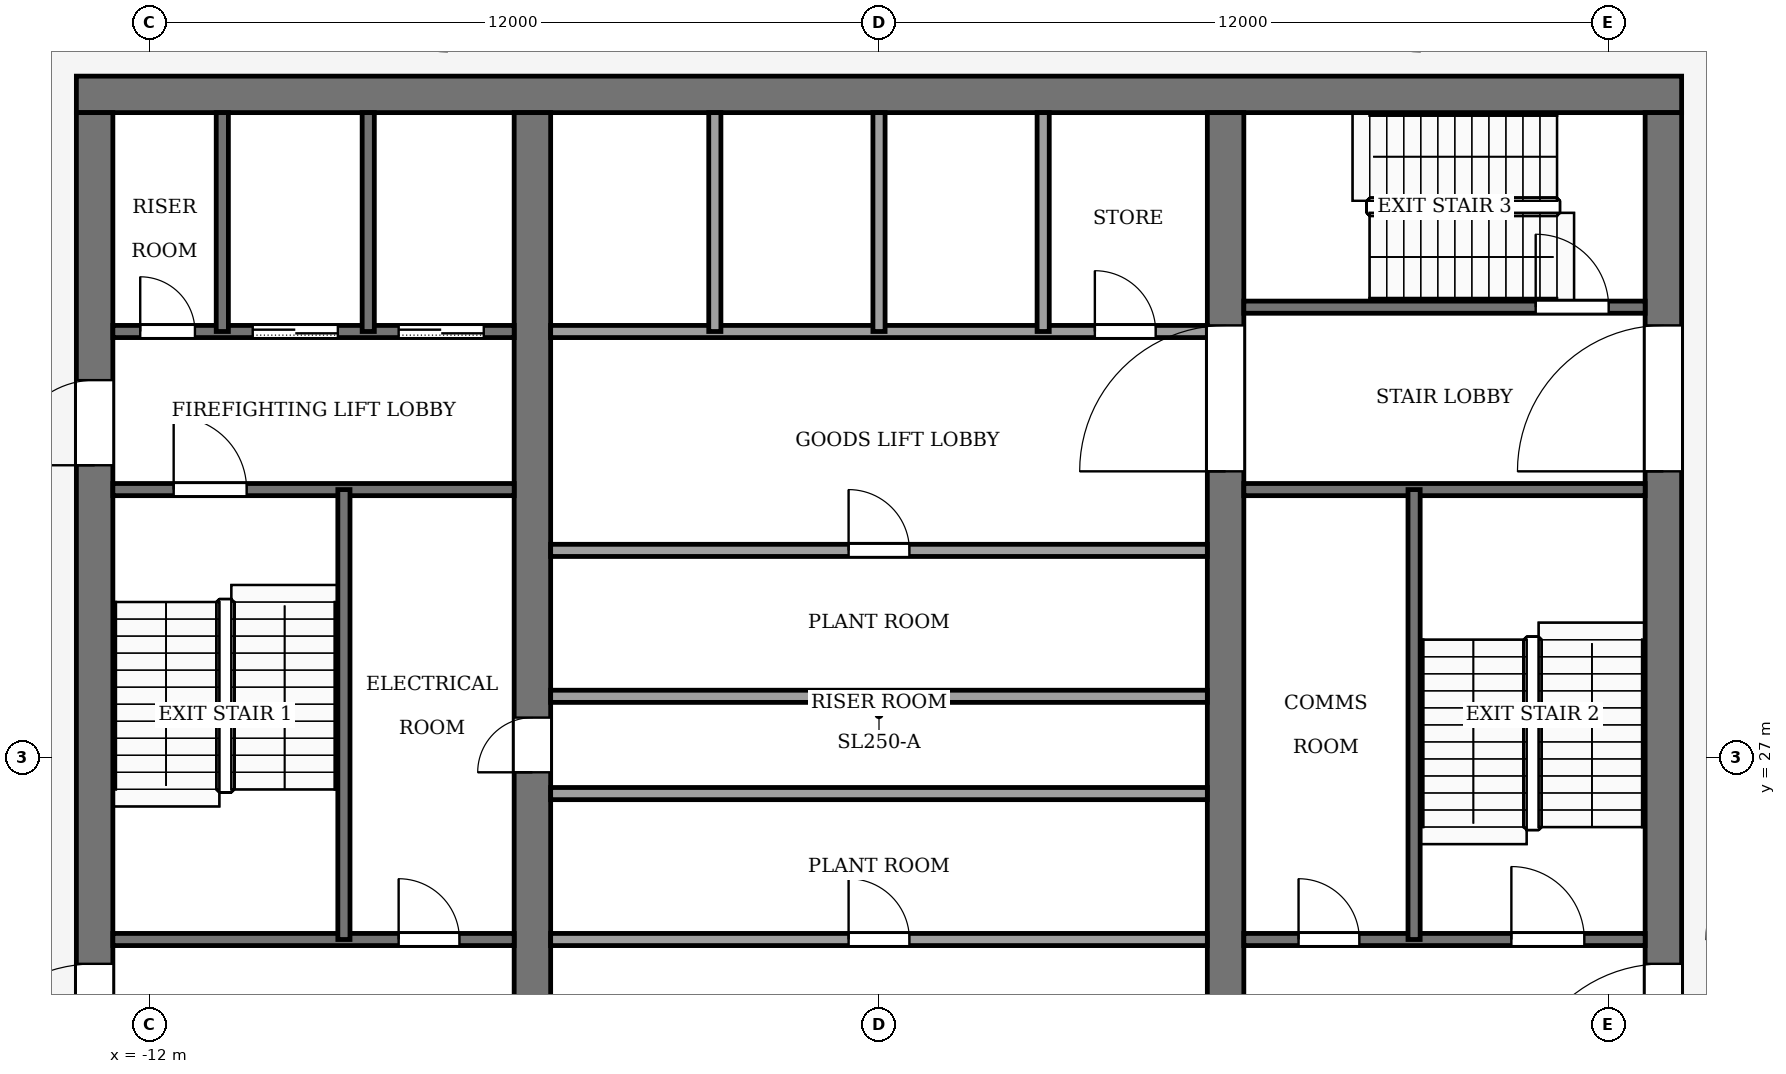
"""IFC4 building model, lengths in metres.
Left out: names, types, materials, properties, quantities, classifications, styles, units other than length and angle.
Written with IfcOpenShell. Run it as: python <this file> out.ifc"""

import sys

from ifc_helpers import new_model, si_unit, direction, frame, frame_2d, origin, place, context, subcontext, project, spatial, rectangle, extrude, element, fill, save


model = new_model("IFC4")
c1 = context("Model", 3, precision=1e-05, world=origin(), true_north=direction((0.0, 1.0)))
c2 = subcontext(c1, "Body", "Model", "MODEL_VIEW")
j1 = project(units=[si_unit("LENGTHUNIT", "METRE"), si_unit("PLANEANGLEUNIT", "RADIAN")], contexts=[c1])
p1 = place(None, origin())
s1 = spatial("IfcSite", under=j1, at=p1, CompositionType="ELEMENT")
p2 = place(p1, origin())
s2 = spatial("IfcBuilding", under=s1, at=p2, CompositionType="ELEMENT")
p3 = place(p2, frame((0.0, 0.0, 340.5)))
s3 = spatial("IfcBuildingStorey", under=s2, at=p3, CompositionType="ELEMENT", Elevation=340.5)
p4 = place(p3, frame((-13.2, 37.9, -0.15), z_axis=(0.0, 0.0, 1.0), x_axis=(1.0, 0.0, 0.0)))
e1 = element("IfcWall", 1, at=p4, inside=s3, PredefinedType="SHEAR", context=c2, shape_type="SweptSolid", body=[
    extrude(rectangle(XDim=26.4, YDim=0.6, at=frame_2d((13.2, 0.0))), origin(), (0.0, 0.0, 1.0), 9.0),
])
p5 = place(p3, frame((-12.9, 18.4, -0.15), z_axis=(0.0, 0.0, 1.0), x_axis=(0.0, 1.0, 0.0)))
e2 = element("IfcWall", 2, at=p5, inside=s3, PredefinedType="SHEAR", context=c2, shape_type="SweptSolid", body=[
    extrude(rectangle(XDim=19.2, YDim=0.6, at=frame_2d((9.6, 0.0))), origin(), (0.0, 0.0, 1.0), 9.0),
])
p6 = place(p5, frame((2.8, 0.0, 0.15)))
e3 = element("IfcOpeningElement", 3, at=p6, cuts=e2, PredefinedType="OPENING", context=c2, shape_type="SweptSolid", body=[
    extrude(rectangle(XDim=2.4, YDim=2.4, at=frame_2d((1.2, 1.2))), frame((0.0, 0.31, 0.0), z_axis=(0.0, -1.0, 0.0), x_axis=(1.0, 0.0, 0.0)), (0.0, 0.0, 1.0), 0.62),
])
p7 = place(p5, frame((13.4, 0.0, 0.15)))
e4 = element("IfcOpeningElement", 4, at=p7, cuts=e2, PredefinedType="OPENING", context=c2, shape_type="SweptSolid", body=[
    extrude(rectangle(XDim=1.4, YDim=2.2, at=frame_2d((0.7, 1.1))), frame((0.0, 0.31, 0.0), z_axis=(0.0, -1.0, 0.0), x_axis=(1.0, 0.0, 0.0)), (0.0, 0.0, 1.0), 0.62),
])
p8 = place(p3, frame((12.9, 18.4, -0.15), z_axis=(0.0, 0.0, 1.0), x_axis=(0.0, 1.0, 0.0)))
e5 = element("IfcWall", 5, at=p8, inside=s3, PredefinedType="SHEAR", context=c2, shape_type="SweptSolid", body=[
    extrude(rectangle(XDim=19.2, YDim=0.6, at=frame_2d((9.6, 0.0))), origin(), (0.0, 0.0, 1.0), 9.0),
])
p9 = place(p8, frame((2.8, 0.0, 0.15)))
e6 = element("IfcOpeningElement", 6, at=p9, cuts=e5, PredefinedType="OPENING", context=c2, shape_type="SweptSolid", body=[
    extrude(rectangle(XDim=2.4, YDim=2.4, at=frame_2d((1.2, 1.2))), frame((0.0, 0.31, 0.0), z_axis=(0.0, -1.0, 0.0), x_axis=(1.0, 0.0, 0.0)), (0.0, 0.0, 1.0), 0.62),
])
p10 = place(p8, frame((13.3, 0.0, 0.15)))
e7 = element("IfcOpeningElement", 7, at=p10, cuts=e5, PredefinedType="OPENING", context=c2, shape_type="SweptSolid", body=[
    extrude(rectangle(XDim=2.4, YDim=2.4, at=frame_2d((1.2, 1.2))), frame((0.0, 0.31, 0.0), z_axis=(0.0, -1.0, 0.0), x_axis=(1.0, 0.0, 0.0)), (0.0, 0.0, 1.0), 0.62),
])
p11 = place(p3, frame((-5.7, 18.4, -0.15), z_axis=(0.0, 0.0, 1.0), x_axis=(0.0, 1.0, 0.0)))
e8 = element("IfcWall", 8, at=p11, inside=s3, PredefinedType="SHEAR", context=c2, shape_type="SweptSolid", body=[
    extrude(rectangle(XDim=19.2, YDim=0.6, at=frame_2d((9.6, 0.0))), origin(), (0.0, 0.0, 1.0), 9.0),
])
p12 = place(p11, frame((8.35, 0.0, 0.15)))
e9 = element("IfcOpeningElement", 9, at=p12, cuts=e8, PredefinedType="OPENING", context=c2, shape_type="SweptSolid", body=[
    extrude(rectangle(XDim=0.9, YDim=2.1, at=frame_2d((0.45, 1.05))), frame((0.0, 0.31, 0.0), z_axis=(0.0, -1.0, 0.0), x_axis=(1.0, 0.0, 0.0)), (0.0, 0.0, 1.0), 0.62),
])
p13 = place(p3, frame((5.7, 18.4, -0.15), z_axis=(0.0, 0.0, 1.0), x_axis=(0.0, 1.0, 0.0)))
e10 = element("IfcWall", 10, at=p13, inside=s3, PredefinedType="SHEAR", context=c2, shape_type="SweptSolid", body=[
    extrude(rectangle(XDim=19.2, YDim=0.6, at=frame_2d((9.6, 0.0))), origin(), (0.0, 0.0, 1.0), 9.0),
])
p14 = place(p13, frame((13.3, 0.0, 0.15)))
e11 = element("IfcOpeningElement", 11, at=p14, cuts=e10, PredefinedType="OPENING", context=c2, shape_type="SweptSolid", body=[
    extrude(rectangle(XDim=2.4, YDim=2.4, at=frame_2d((1.2, 1.2))), frame((0.0, 0.31, 0.0), z_axis=(0.0, -1.0, 0.0), x_axis=(1.0, 0.0, 0.0)), (0.0, 0.0, 1.0), 0.62),
])
p15 = place(p3, frame((-12.6, 24.0, 0.0), z_axis=(0.0, 0.0, 1.0), x_axis=(1.0, 0.0, 0.0)))
e12 = element("IfcWall", 12, at=p15, inside=s3, PredefinedType="PARTITIONING", context=c2, shape_type="SweptSolid", body=[
    extrude(rectangle(XDim=6.6, YDim=0.2, at=frame_2d((3.3, 0.0))), origin(), (0.0, 0.0, 1.0), 8.85),
])
p16 = place(p15, frame((4.7, 0.0, 0.0)))
e13 = element("IfcOpeningElement", 13, at=p16, cuts=e12, PredefinedType="OPENING", context=c2, shape_type="SweptSolid", body=[
    extrude(rectangle(XDim=1.0, YDim=2.1, at=frame_2d((0.5, 1.05))), frame((0.0, 0.11, 0.0), z_axis=(0.0, -1.0, 0.0), x_axis=(1.0, 0.0, 0.0)), (0.0, 0.0, 1.0), 0.22),
])
p17 = place(p3, frame((-5.4, 24.0, 0.0), z_axis=(0.0, 0.0, 1.0), x_axis=(1.0, 0.0, 0.0)))
e14 = element("IfcWall", 14, at=p17, inside=s3, PredefinedType="PARTITIONING", context=c2, shape_type="SweptSolid", body=[
    extrude(rectangle(XDim=10.8, YDim=0.2, at=frame_2d((5.4, 0.0))), origin(), (0.0, 0.0, 1.0), 8.85),
])
p18 = place(p17, frame((4.9, 0.0, 0.0)))
e15 = element("IfcOpeningElement", 15, at=p18, cuts=e14, PredefinedType="OPENING", context=c2, shape_type="SweptSolid", body=[
    extrude(rectangle(XDim=1.0, YDim=2.1, at=frame_2d((0.5, 1.05))), frame((0.0, 0.11, 0.0), z_axis=(0.0, -1.0, 0.0), x_axis=(1.0, 0.0, 0.0)), (0.0, 0.0, 1.0), 0.22),
])
p19 = place(p3, frame((6.0, 24.0, 0.0), z_axis=(0.0, 0.0, 1.0), x_axis=(1.0, 0.0, 0.0)))
e16 = element("IfcWall", 16, at=p19, inside=s3, PredefinedType="PARTITIONING", context=c2, shape_type="SweptSolid", body=[
    extrude(rectangle(XDim=6.6, YDim=0.2, at=frame_2d((3.3, 0.0))), origin(), (0.0, 0.0, 1.0), 8.85),
])
p20 = place(p19, frame((0.9, 0.0, 0.0)))
e17 = element("IfcOpeningElement", 17, at=p20, cuts=e16, PredefinedType="OPENING", context=c2, shape_type="SweptSolid", body=[
    extrude(rectangle(XDim=1.0, YDim=2.1, at=frame_2d((0.5, 1.05))), frame((0.0, 0.11, 0.0), z_axis=(0.0, -1.0, 0.0), x_axis=(1.0, 0.0, 0.0)), (0.0, 0.0, 1.0), 0.22),
])
p21 = place(p19, frame((4.4, 0.0, 0.0)))
e18 = element("IfcOpeningElement", 18, at=p21, cuts=e16, PredefinedType="OPENING", context=c2, shape_type="SweptSolid", body=[
    extrude(rectangle(XDim=1.2, YDim=2.2, at=frame_2d((0.6, 1.1))), frame((0.0, 0.11, 0.0), z_axis=(0.0, -1.0, 0.0), x_axis=(1.0, 0.0, 0.0)), (0.0, 0.0, 1.0), 0.22),
])
for number, where, z_axis, x_axis in (
    (19, (-5.4, 26.4, 0.0), (0.0, 0.0, 1.0), (1.0, 0.0, 0.0)),
    (20, (-5.4, 28.0, 0.0), (0.0, 0.0, 1.0), (1.0, 0.0, 0.0)),
):
    element("IfcWall", number, at=place(p3, frame(where, z_axis=z_axis, x_axis=x_axis)), inside=s3, PredefinedType="PARTITIONING", context=c2, shape_type="SweptSolid", body=[
        extrude(rectangle(XDim=10.8, YDim=0.2, at=frame_2d((5.4, 0.0))), origin(), (0.0, 0.0, 1.0), 8.85),
    ])
p22 = place(p3, frame((-5.4, 30.4, 0.0), z_axis=(0.0, 0.0, 1.0), x_axis=(1.0, 0.0, 0.0)))
e21 = element("IfcWall", 21, at=p22, inside=s3, PredefinedType="PARTITIONING", context=c2, shape_type="SweptSolid", body=[
    extrude(rectangle(XDim=10.8, YDim=0.2, at=frame_2d((5.4, 0.0))), origin(), (0.0, 0.0, 1.0), 8.85),
])
p23 = place(p22, frame((4.9, 0.0, 0.0)))
e22 = element("IfcOpeningElement", 22, at=p23, cuts=e21, PredefinedType="OPENING", context=c2, shape_type="SweptSolid", body=[
    extrude(rectangle(XDim=1.0, YDim=2.1, at=frame_2d((0.5, 1.05))), frame((0.0, 0.11, 0.0), z_axis=(0.0, -1.0, 0.0), x_axis=(1.0, 0.0, 0.0)), (0.0, 0.0, 1.0), 0.22),
])
p24 = place(p3, frame((-12.6, 31.4, 0.0), z_axis=(0.0, 0.0, 1.0), x_axis=(1.0, 0.0, 0.0)))
e23 = element("IfcWall", 23, at=p24, inside=s3, PredefinedType="PARTITIONING", context=c2, shape_type="SweptSolid", body=[
    extrude(rectangle(XDim=6.6, YDim=0.2, at=frame_2d((3.3, 0.0))), origin(), (0.0, 0.0, 1.0), 8.85),
])
p25 = place(p24, frame((1.0, 0.0, 0.0)))
e24 = element("IfcOpeningElement", 24, at=p25, cuts=e23, PredefinedType="OPENING", context=c2, shape_type="SweptSolid", body=[
    extrude(rectangle(XDim=1.2, YDim=2.2, at=frame_2d((0.6, 1.1))), frame((0.0, 0.11, 0.0), z_axis=(0.0, -1.0, 0.0), x_axis=(1.0, 0.0, 0.0)), (0.0, 0.0, 1.0), 0.22),
])
p26 = place(p3, frame((6.0, 31.4, 0.0), z_axis=(0.0, 0.0, 1.0), x_axis=(1.0, 0.0, 0.0)))
e25 = element("IfcWall", 25, at=p26, inside=s3, PredefinedType="PARTITIONING", context=c2, shape_type="SweptSolid", body=[
    extrude(rectangle(XDim=6.6, YDim=0.2, at=frame_2d((3.3, 0.0))), origin(), (0.0, 0.0, 1.0), 8.85),
])
p27 = place(p3, frame((-12.6, 34.0, 0.0), z_axis=(0.0, 0.0, 1.0), x_axis=(1.0, 0.0, 0.0)))
e26 = element("IfcWall", 26, at=p27, inside=s3, PredefinedType="PARTITIONING", context=c2, shape_type="SweptSolid", body=[
    extrude(rectangle(XDim=6.6, YDim=0.2, at=frame_2d((3.3, 0.0))), origin(), (0.0, 0.0, 1.0), 8.85),
])
p28 = place(p27, frame((4.7, 0.0, 0.0)))
e27 = element("IfcOpeningElement", 27, at=p28, cuts=e26, PredefinedType="OPENING", context=c2, shape_type="SweptSolid", body=[
    extrude(rectangle(XDim=1.4, YDim=2.2, at=frame_2d((0.7, 1.1))), frame((0.0, 0.11, 0.0), z_axis=(0.0, -1.0, 0.0), x_axis=(1.0, 0.0, 0.0)), (0.0, 0.0, 1.0), 0.22),
])
p29 = place(p27, frame((2.3, 0.0, 0.0)))
e28 = element("IfcOpeningElement", 28, at=p29, cuts=e26, PredefinedType="OPENING", context=c2, shape_type="SweptSolid", body=[
    extrude(rectangle(XDim=1.4, YDim=2.2, at=frame_2d((0.7, 1.1))), frame((0.0, 0.11, 0.0), z_axis=(0.0, -1.0, 0.0), x_axis=(1.0, 0.0, 0.0)), (0.0, 0.0, 1.0), 0.22),
])
p30 = place(p27, frame((0.45, 0.0, 0.0)))
e29 = element("IfcOpeningElement", 29, at=p30, cuts=e26, PredefinedType="OPENING", context=c2, shape_type="SweptSolid", body=[
    extrude(rectangle(XDim=0.9, YDim=2.1, at=frame_2d((0.45, 1.05))), frame((0.0, 0.11, 0.0), z_axis=(0.0, -1.0, 0.0), x_axis=(1.0, 0.0, 0.0)), (0.0, 0.0, 1.0), 0.22),
])
p31 = place(p3, frame((-5.4, 34.0, 0.0), z_axis=(0.0, 0.0, 1.0), x_axis=(1.0, 0.0, 0.0)))
e30 = element("IfcWall", 30, at=p31, inside=s3, PredefinedType="PARTITIONING", context=c2, shape_type="SweptSolid", body=[
    extrude(rectangle(XDim=10.8, YDim=0.2, at=frame_2d((5.4, 0.0))), origin(), (0.0, 0.0, 1.0), 8.85),
])
p32 = place(p31, frame((8.95, 0.0, 0.0)))
e31 = element("IfcOpeningElement", 31, at=p32, cuts=e30, PredefinedType="OPENING", context=c2, shape_type="SweptSolid", body=[
    extrude(rectangle(XDim=1.0, YDim=2.1, at=frame_2d((0.5, 1.05))), frame((0.0, 0.11, 0.0), z_axis=(0.0, -1.0, 0.0), x_axis=(1.0, 0.0, 0.0)), (0.0, 0.0, 1.0), 0.22),
])
p33 = place(p3, frame((6.0, 34.4, 0.0), z_axis=(0.0, 0.0, 1.0), x_axis=(1.0, 0.0, 0.0)))
e32 = element("IfcWall", 32, at=p33, inside=s3, PredefinedType="PARTITIONING", context=c2, shape_type="SweptSolid", body=[
    extrude(rectangle(XDim=6.6, YDim=0.2, at=frame_2d((3.3, 0.0))), origin(), (0.0, 0.0, 1.0), 8.85),
])
p34 = place(p33, frame((4.8, 0.0, 0.0)))
e33 = element("IfcOpeningElement", 33, at=p34, cuts=e32, PredefinedType="OPENING", context=c2, shape_type="SweptSolid", body=[
    extrude(rectangle(XDim=1.2, YDim=2.2, at=frame_2d((0.6, 1.1))), frame((0.0, 0.11, 0.0), z_axis=(0.0, -1.0, 0.0), x_axis=(1.0, 0.0, 0.0)), (0.0, 0.0, 1.0), 0.22),
])
p35 = place(p3, frame((-10.8, 34.0, 0.0), z_axis=(0.0, 0.0, 1.0), x_axis=(0.0, 1.0, 0.0)))
e34 = element("IfcWall", 34, at=p35, inside=s3, PredefinedType="PARTITIONING", context=c2, shape_type="SweptSolid", body=[
    extrude(rectangle(XDim=3.6, YDim=0.2, at=frame_2d((1.8, 0.0))), origin(), (0.0, 0.0, 1.0), 8.85),
])
p36 = place(p3, frame((-8.8, 24.0, 0.0), z_axis=(0.0, 0.0, 1.0), x_axis=(0.0, 1.0, 0.0)))
e35 = element("IfcWall", 35, at=p36, inside=s3, PredefinedType="PARTITIONING", context=c2, shape_type="SweptSolid", body=[
    extrude(rectangle(XDim=7.4, YDim=0.2, at=frame_2d((3.7, 0.0))), origin(), (0.0, 0.0, 1.0), 8.85),
])
for number, where, z_axis, x_axis in (
    (36, (-8.4, 34.0, 0.0), (0.0, 0.0, 1.0), (0.0, 1.0, 0.0)),
    (37, (-2.7, 34.0, 0.0), (0.0, 0.0, 1.0), (0.0, 1.0, 0.0)),
    (38, (0.0, 34.0, 0.0), (0.0, 0.0, 1.0), (0.0, 1.0, 0.0)),
    (39, (2.7, 34.0, 0.0), (0.0, 0.0, 1.0), (0.0, 1.0, 0.0)),
):
    element("IfcWall", number, at=place(p3, frame(where, z_axis=z_axis, x_axis=x_axis)), inside=s3, PredefinedType="PARTITIONING", context=c2, shape_type="SweptSolid", body=[
        extrude(rectangle(XDim=3.6, YDim=0.2, at=frame_2d((1.8, 0.0))), origin(), (0.0, 0.0, 1.0), 8.85),
    ])
p37 = place(p3, frame((8.8, 24.0, 0.0), z_axis=(0.0, 0.0, 1.0), x_axis=(0.0, 1.0, 0.0)))
e40 = element("IfcWall", 40, at=p37, inside=s3, PredefinedType="PARTITIONING", context=c2, shape_type="SweptSolid", body=[
    extrude(rectangle(XDim=7.4, YDim=0.2, at=frame_2d((3.7, 0.0))), origin(), (0.0, 0.0, 1.0), 8.85),
])
p38 = place(p28, origin())
e41 = element("IfcDoor", 41, at=p38, inside=s3, OperationType="SLIDING_TO_LEFT", PredefinedType="DOOR", context=c2, shape_type="SweptSolid", body=[
    extrude(rectangle(XDim=1.4, YDim=2.2, at=frame_2d((0.7, 1.1))), frame((0.0, 0.025, 0.0), z_axis=(0.0, -1.0, 0.0), x_axis=(1.0, 0.0, 0.0)), (0.0, 0.0, 1.0), 0.05),
])
fill(e27, e41)
p39 = place(p29, origin())
e42 = element("IfcDoor", 42, at=p39, inside=s3, OperationType="SLIDING_TO_LEFT", PredefinedType="DOOR", context=c2, shape_type="SweptSolid", body=[
    extrude(rectangle(XDim=1.4, YDim=2.2, at=frame_2d((0.7, 1.1))), frame((0.0, 0.025, 0.0), z_axis=(0.0, -1.0, 0.0), x_axis=(1.0, 0.0, 0.0)), (0.0, 0.0, 1.0), 0.05),
])
fill(e28, e42)
p40 = place(p30, origin())
e43 = element("IfcDoor", 43, at=p40, inside=s3, OperationType="SINGLE_SWING_LEFT", PredefinedType="DOOR", context=c2, shape_type="SweptSolid", body=[
    extrude(rectangle(XDim=0.9, YDim=2.1, at=frame_2d((0.45, 1.05))), frame((0.0, 0.025, 0.0), z_axis=(0.0, -1.0, 0.0), x_axis=(1.0, 0.0, 0.0)), (0.0, 0.0, 1.0), 0.05),
])
fill(e29, e43)
p41 = place(p18, origin())
e44 = element("IfcDoor", 44, at=p41, inside=s3, OperationType="SINGLE_SWING_LEFT", PredefinedType="DOOR", context=c2, shape_type="SweptSolid", body=[
    extrude(rectangle(XDim=1.0, YDim=2.1, at=frame_2d((0.5, 1.05))), frame((0.0, 0.025, 0.0), z_axis=(0.0, -1.0, 0.0), x_axis=(1.0, 0.0, 0.0)), (0.0, 0.0, 1.0), 0.05),
])
fill(e15, e44)
p42 = place(p23, origin())
e45 = element("IfcDoor", 45, at=p42, inside=s3, OperationType="SINGLE_SWING_RIGHT", PredefinedType="DOOR", context=c2, shape_type="SweptSolid", body=[
    extrude(rectangle(XDim=1.0, YDim=2.1, at=frame_2d((0.5, 1.05))), frame((0.0, 0.025, 0.0), z_axis=(0.0, -1.0, 0.0), x_axis=(1.0, 0.0, 0.0)), (0.0, 0.0, 1.0), 0.05),
])
fill(e22, e45)
p43 = place(p16, origin())
e46 = element("IfcDoor", 46, at=p43, inside=s3, OperationType="SINGLE_SWING_LEFT", PredefinedType="DOOR", context=c2, shape_type="SweptSolid", body=[
    extrude(rectangle(XDim=1.0, YDim=2.1, at=frame_2d((0.5, 1.05))), frame((0.0, 0.025, 0.0), z_axis=(0.0, -1.0, 0.0), x_axis=(1.0, 0.0, 0.0)), (0.0, 0.0, 1.0), 0.05),
])
fill(e13, e46)
p44 = place(p20, origin())
e47 = element("IfcDoor", 47, at=p44, inside=s3, OperationType="SINGLE_SWING_RIGHT", PredefinedType="DOOR", context=c2, shape_type="SweptSolid", body=[
    extrude(rectangle(XDim=1.0, YDim=2.1, at=frame_2d((0.5, 1.05))), frame((0.0, 0.025, 0.0), z_axis=(0.0, -1.0, 0.0), x_axis=(1.0, 0.0, 0.0)), (0.0, 0.0, 1.0), 0.05),
])
fill(e17, e47)
p45 = place(p32, origin())
e48 = element("IfcDoor", 48, at=p45, inside=s3, OperationType="SINGLE_SWING_LEFT", PredefinedType="DOOR", context=c2, shape_type="SweptSolid", body=[
    extrude(rectangle(XDim=1.0, YDim=2.1, at=frame_2d((0.5, 1.05))), frame((0.0, 0.025, 0.0), z_axis=(0.0, -1.0, 0.0), x_axis=(1.0, 0.0, 0.0)), (0.0, 0.0, 1.0), 0.05),
])
fill(e31, e48)
p46 = place(p12, origin())
e49 = element("IfcDoor", 49, at=p46, inside=s3, OperationType="SINGLE_SWING_LEFT", PredefinedType="DOOR", context=c2, shape_type="SweptSolid", body=[
    extrude(rectangle(XDim=0.9, YDim=2.1, at=frame_2d((0.45, 1.05))), frame((0.0, 0.025, 0.0), z_axis=(0.0, -1.0, 0.0), x_axis=(1.0, 0.0, 0.0)), (0.0, 0.0, 1.0), 0.05),
])
fill(e9, e49)
p47 = place(p25, origin())
e50 = element("IfcDoor", 50, at=p47, inside=s3, OperationType="SINGLE_SWING_LEFT", PredefinedType="DOOR", context=c2, shape_type="SweptSolid", body=[
    extrude(rectangle(XDim=1.2, YDim=2.2, at=frame_2d((0.6, 1.1))), frame((0.0, 0.025, 0.0), z_axis=(0.0, -1.0, 0.0), x_axis=(1.0, 0.0, 0.0)), (0.0, 0.0, 1.0), 0.05),
])
fill(e24, e50)
p48 = place(p21, origin())
e51 = element("IfcDoor", 51, at=p48, inside=s3, OperationType="SINGLE_SWING_RIGHT", PredefinedType="DOOR", context=c2, shape_type="SweptSolid", body=[
    extrude(rectangle(XDim=1.2, YDim=2.2, at=frame_2d((0.6, 1.1))), frame((0.0, 0.025, 0.0), z_axis=(0.0, -1.0, 0.0), x_axis=(1.0, 0.0, 0.0)), (0.0, 0.0, 1.0), 0.05),
])
fill(e18, e51)
p49 = place(p34, origin())
e52 = element("IfcDoor", 52, at=p49, inside=s3, OperationType="SINGLE_SWING_LEFT", PredefinedType="DOOR", context=c2, shape_type="SweptSolid", body=[
    extrude(rectangle(XDim=1.2, YDim=2.2, at=frame_2d((0.6, 1.1))), frame((0.0, 0.025, 0.0), z_axis=(0.0, -1.0, 0.0), x_axis=(1.0, 0.0, 0.0)), (0.0, 0.0, 1.0), 0.05),
])
fill(e33, e52)
p50 = place(p14, origin())
e53 = element("IfcDoor", 53, at=p50, inside=s3, OperationType="DOUBLE_DOOR_SINGLE_SWING", PredefinedType="DOOR", context=c2, shape_type="SweptSolid", body=[
    extrude(rectangle(XDim=2.4, YDim=2.4, at=frame_2d((1.2, 1.2))), frame((0.0, 0.025, 0.0), z_axis=(0.0, -1.0, 0.0), x_axis=(1.0, 0.0, 0.0)), (0.0, 0.0, 1.0), 0.05),
])
fill(e11, e53)
p51 = place(p6, origin())
e54 = element("IfcDoor", 54, at=p51, inside=s3, OperationType="DOUBLE_DOOR_SINGLE_SWING", PredefinedType="DOOR", context=c2, shape_type="SweptSolid", body=[
    extrude(rectangle(XDim=2.4, YDim=2.4, at=frame_2d((1.2, 1.2))), frame((0.0, 0.025, 0.0), z_axis=(0.0, -1.0, 0.0), x_axis=(1.0, 0.0, 0.0)), (0.0, 0.0, 1.0), 0.05),
])
fill(e3, e54)
p52 = place(p9, origin())
e55 = element("IfcDoor", 55, at=p52, inside=s3, OperationType="DOUBLE_DOOR_SINGLE_SWING", PredefinedType="DOOR", context=c2, shape_type="SweptSolid", body=[
    extrude(rectangle(XDim=2.4, YDim=2.4, at=frame_2d((1.2, 1.2))), frame((0.0, 0.025, 0.0), z_axis=(0.0, -1.0, 0.0), x_axis=(1.0, 0.0, 0.0)), (0.0, 0.0, 1.0), 0.05),
])
fill(e6, e55)
p53 = place(p10, origin())
e56 = element("IfcDoor", 56, at=p53, inside=s3, OperationType="DOUBLE_DOOR_SINGLE_SWING", PredefinedType="DOOR", context=c2, shape_type="SweptSolid", body=[
    extrude(rectangle(XDim=2.4, YDim=2.4, at=frame_2d((1.2, 1.2))), frame((0.0, 0.025, 0.0), z_axis=(0.0, -1.0, 0.0), x_axis=(1.0, 0.0, 0.0)), (0.0, 0.0, 1.0), 0.05),
])
fill(e7, e56)
p54 = place(p7, origin())
e57 = element("IfcDoor", 57, at=p54, inside=s3, OperationType="SINGLE_SWING_LEFT", PredefinedType="DOOR", context=c2, shape_type="SweptSolid", body=[
    extrude(rectangle(XDim=1.4, YDim=2.2, at=frame_2d((0.7, 1.1))), frame((0.0, 0.025, 0.0), z_axis=(0.0, -1.0, 0.0), x_axis=(1.0, 0.0, 0.0)), (0.0, 0.0, 1.0), 0.05),
])
fill(e4, e57)
save(model, sys.argv[1])
